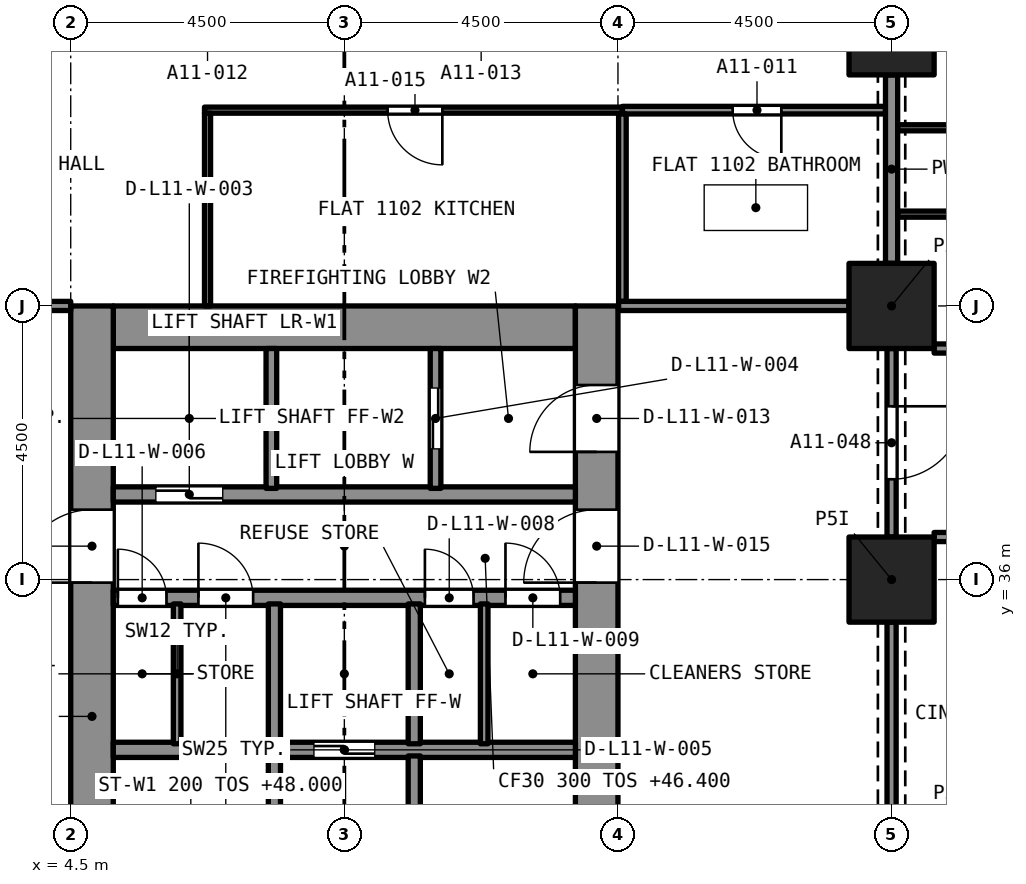
"""IFC4 building model, lengths in metres.
Left out: names, types, materials, properties, quantities, classifications, styles, units other than length and angle.
Written with IfcOpenShell. Run it as: python <this file> out.ifc"""

import sys

from ifc_helpers import new_model, si_unit, direction, frame, frame_2d, origin, origin_2d, place, context, subcontext, project, spatial, rectangle, extrude, element, fill, save


model = new_model("IFC4")
c1 = context("Model", 3, precision=1e-05, world=origin(), true_north=direction((0.0, 1.0)))
c2 = subcontext(c1, "Body", "Model", "MODEL_VIEW")
j1 = project(units=[si_unit("LENGTHUNIT", "METRE"), si_unit("PLANEANGLEUNIT", "RADIAN")], contexts=[c1])
p1 = place(None, origin())
s1 = spatial("IfcSite", under=j1, at=p1, CompositionType="ELEMENT")
p2 = place(p1, origin())
s2 = spatial("IfcBuilding", under=s1, at=p2, CompositionType="ELEMENT")
p3 = place(p2, frame((0.0, 0.0, 46.4)))
s3 = spatial("IfcBuildingStorey", under=s2, at=p3, CompositionType="ELEMENT", Elevation=46.4)
for number, where, z_axis, x_axis in (
    (1, (18.0, 36.0, 0.0), (0.0, 0.0, 1.0), (1.0, 0.0, 0.0)),
    (2, (18.0, 40.5, 0.0), (0.0, 0.0, 1.0), (1.0, 0.0, 0.0)),
    (3, (18.0, 45.0, 0.0), (0.0, 0.0, 1.0), (1.0, 0.0, 0.0)),
):
    element("IfcColumn", number, at=place(p3, frame(where, z_axis=z_axis, x_axis=x_axis)), inside=s3, PredefinedType="COLUMN", context=c2, shape_type="SweptSolid", body=[
        extrude(rectangle(XDim=1.4, YDim=1.4, at=origin_2d()), origin(), (0.0, 0.0, 1.0), 3.2),
    ])
p4 = place(p3, frame((5.2, 40.15, 0.0), z_axis=(0.0, 0.0, 1.0), x_axis=(1.0, 0.0, 0.0)))
e4 = element("IfcWall", 4, at=p4, inside=s3, PredefinedType="SOLIDWALL", context=c2, shape_type="SweptSolid", body=[
    extrude(rectangle(XDim=7.6, YDim=0.7, at=frame_2d((3.8, 0.0))), origin(), (0.0, 0.0, 1.0), 3.2),
])
p5 = place(p3, frame((4.85, 27.0, 0.0), z_axis=(0.0, 0.0, 1.0), x_axis=(0.0, 1.0, 0.0)))
e5 = element("IfcWall", 5, at=p5, inside=s3, PredefinedType="SOLIDWALL", context=c2, shape_type="SweptSolid", body=[
    extrude(rectangle(XDim=13.5, YDim=0.7, at=frame_2d((6.75, 0.0))), origin(), (0.0, 0.0, 1.0), 3.2),
])
p6 = place(p5, frame((8.95, 0.0, 0.0)))
e6 = element("IfcOpeningElement", 6, at=p6, cuts=e5, PredefinedType="OPENING", context=c2, shape_type="SweptSolid", body=[
    extrude(rectangle(XDim=1.2, YDim=2.1, at=frame_2d((0.6, 1.05))), frame((0.0, 0.36, 0.0), z_axis=(0.0, -1.0, 0.0), x_axis=(1.0, 0.0, 0.0)), (0.0, 0.0, 1.0), 0.72),
])
p7 = place(p3, frame((13.15, 27.0, 0.0), z_axis=(0.0, 0.0, 1.0), x_axis=(0.0, 1.0, 0.0)))
e7 = element("IfcWall", 7, at=p7, inside=s3, PredefinedType="SOLIDWALL", context=c2, shape_type="SweptSolid", body=[
    extrude(rectangle(XDim=13.5, YDim=0.7, at=frame_2d((6.75, 0.0))), origin(), (0.0, 0.0, 1.0), 3.2),
])
p8 = place(p7, frame((11.1, 0.0, 0.0)))
e8 = element("IfcOpeningElement", 8, at=p8, cuts=e7, PredefinedType="OPENING", context=c2, shape_type="SweptSolid", body=[
    extrude(rectangle(XDim=1.1, YDim=2.1, at=frame_2d((0.55, 1.05))), frame((0.0, 0.36, 0.0), z_axis=(0.0, -1.0, 0.0), x_axis=(1.0, 0.0, 0.0)), (0.0, 0.0, 1.0), 0.72),
])
p9 = place(p7, frame((8.95, 0.0, 0.0)))
e9 = element("IfcOpeningElement", 9, at=p9, cuts=e7, PredefinedType="OPENING", context=c2, shape_type="SweptSolid", body=[
    extrude(rectangle(XDim=1.2, YDim=2.1, at=frame_2d((0.6, 1.05))), frame((0.0, 0.36, 0.0), z_axis=(0.0, -1.0, 0.0), x_axis=(1.0, 0.0, 0.0)), (0.0, 0.0, 1.0), 0.72),
])
p10 = place(p3, frame((17.9, 43.72, 0.0), z_axis=(0.0, 0.0, 1.0), x_axis=(-1.0, 0.0, 0.0)))
e10 = element("IfcWall", 10, at=p10, inside=s3, PredefinedType="PARTITIONING", context=c2, shape_type="SweptSolid", body=[
    extrude(rectangle(XDim=4.327, YDim=0.125, at=frame_2d((2.163, 0.0))), origin(), (0.0, 0.0, 1.0), 2.9),
])
p11 = place(p10, frame((1.713, 0.0, 0.0)))
e11 = element("IfcOpeningElement", 11, at=p11, cuts=e10, PredefinedType="OPENING", context=c2, shape_type="SweptSolid", body=[
    extrude(rectangle(XDim=0.8, YDim=2.1, at=frame_2d((0.4, 1.05))), frame((0.0, 0.073, 0.0), z_axis=(0.0, -1.0, 0.0), x_axis=(1.0, 0.0, 0.0)), (0.0, 0.0, 1.0), 0.145),
])
p12 = place(p3, frame((13.573, 40.575, 0.0), z_axis=(0.0, 0.0, 1.0), x_axis=(0.0, 1.0, 0.0)))
e12 = element("IfcWall", 12, at=p12, inside=s3, PredefinedType="PARTITIONING", context=c2, shape_type="SweptSolid", body=[
    extrude(rectangle(XDim=3.083, YDim=0.125, at=frame_2d((1.541, 0.0))), origin(), (0.0, 0.0, 1.0), 2.9),
])
p13 = place(p3, frame((18.0, 41.2, 0.0), z_axis=(0.0, 0.0, 1.0), x_axis=(0.0, 1.0, 0.0)))
e13 = element("IfcWall", 13, at=p13, inside=s3, PredefinedType="PARTITIONING", context=c2, shape_type="SweptSolid", body=[
    extrude(rectangle(XDim=3.1, YDim=0.2, at=frame_2d((1.55, 0.0))), origin(), (0.0, 0.0, 1.0), 2.38),
])
p14 = place(p3, frame((13.511, 40.5, 0.0), z_axis=(0.0, 0.0, 1.0), x_axis=(1.0, 0.0, 0.0)))
e14 = element("IfcWall", 14, at=p14, inside=s3, PredefinedType="PARTITIONING", context=c2, shape_type="SweptSolid", body=[
    extrude(rectangle(XDim=3.789, YDim=0.15, at=frame_2d((1.895, 0.0))), origin(), (0.0, 0.0, 1.0), 2.9),
])
p15 = place(p3, frame((13.573, 43.72, 0.0), z_axis=(0.0, 0.0, 1.0), x_axis=(-1.0, 0.0, 0.0)))
e15 = element("IfcWall", 15, at=p15, inside=s3, PredefinedType="PARTITIONING", context=c2, shape_type="SweptSolid", body=[
    extrude(rectangle(XDim=6.873, YDim=0.1, at=frame_2d((3.437, 0.0))), origin(), (0.0, 0.0, 1.0), 2.9),
])
p16 = place(p15, frame((2.962, 0.0, 0.0)))
e16 = element("IfcOpeningElement", 16, at=p16, cuts=e15, PredefinedType="OPENING", context=c2, shape_type="SweptSolid", body=[
    extrude(rectangle(XDim=0.9, YDim=2.1, at=frame_2d((0.45, 1.05))), frame((0.0, 0.06, 0.0), z_axis=(0.0, -1.0, 0.0), x_axis=(1.0, 0.0, 0.0)), (0.0, 0.0, 1.0), 0.12),
])
p17 = place(p3, frame((6.75, 40.5, 0.0), z_axis=(0.0, 0.0, 1.0), x_axis=(0.0, 1.0, 0.0)))
e17 = element("IfcWall", 17, at=p17, inside=s3, PredefinedType="PARTITIONING", context=c2, shape_type="SweptSolid", body=[
    extrude(rectangle(XDim=3.17, YDim=0.1, at=frame_2d((1.585, 0.0))), origin(), (0.0, 0.0, 1.0), 2.9),
])
p18 = place(p3, frame((0.7, 40.5, 0.0), z_axis=(0.0, 0.0, 1.0), x_axis=(1.0, 0.0, 0.0)))
e18 = element("IfcWall", 18, at=p18, inside=s3, PredefinedType="PARTITIONING", context=c2, shape_type="SweptSolid", body=[
    extrude(rectangle(XDim=3.8, YDim=0.15, at=frame_2d((1.9, 0.0))), origin(), (0.0, 0.0, 1.0), 2.9),
])
p19 = place(p18, frame((1.05, 0.0, 0.0)))
e19 = element("IfcOpeningElement", 19, at=p19, cuts=e18, PredefinedType="OPENING", context=c2, shape_type="SweptSolid", body=[
    extrude(rectangle(XDim=1.0, YDim=2.1, at=frame_2d((0.5, 1.05))), frame((0.0, 0.085, 0.0), z_axis=(0.0, -1.0, 0.0), x_axis=(1.0, 0.0, 0.0)), (0.0, 0.0, 1.0), 0.17),
])
p20 = place(p3, frame((27.425, 42.01, 0.0), z_axis=(0.0, 0.0, 1.0), x_axis=(-1.0, 0.0, 0.0)))
e20 = element("IfcWall", 20, at=p20, inside=s3, PredefinedType="PARTITIONING", context=c2, shape_type="SweptSolid", body=[
    extrude(rectangle(XDim=9.325, YDim=0.1, at=frame_2d((4.663, 0.0))), origin(), (0.0, 0.0, 1.0), 2.75),
])
p21 = place(p20, frame((4.288, 0.0, 0.0)))
e21 = element("IfcOpeningElement", 21, at=p21, cuts=e20, PredefinedType="OPENING", context=c2, shape_type="SweptSolid", body=[
    extrude(rectangle(XDim=0.9, YDim=2.1, at=frame_2d((0.45, 1.05))), frame((0.0, 0.06, 0.0), z_axis=(0.0, -1.0, 0.0), x_axis=(1.0, 0.0, 0.0)), (0.0, 0.0, 1.0), 0.12),
])
p22 = place(p3, frame((18.1, 43.43, 0.0), z_axis=(0.0, 0.0, 1.0), x_axis=(1.0, 0.0, 0.0)))
e22 = element("IfcWall", 22, at=p22, inside=s3, PredefinedType="PARTITIONING", context=c2, shape_type="SweptSolid", body=[
    extrude(rectangle(XDim=4.4, YDim=0.1, at=frame_2d((2.2, 0.0))), origin(), (0.0, 0.0, 1.0), 2.75),
])
p23 = place(p22, frame((1.65, 0.0, 0.0)))
e23 = element("IfcOpeningElement", 23, at=p23, cuts=e22, PredefinedType="OPENING", context=c2, shape_type="SweptSolid", body=[
    extrude(rectangle(XDim=1.0, YDim=2.1, at=frame_2d((0.5, 1.05))), frame((0.0, 0.06, 0.0), z_axis=(0.0, -1.0, 0.0), x_axis=(1.0, 0.0, 0.0)), (0.0, 0.0, 1.0), 0.12),
])
p24 = place(p3, frame((18.7, 39.8, 0.0), z_axis=(0.0, 0.0, 1.0), x_axis=(1.0, 0.0, 0.0)))
e24 = element("IfcWall", 24, at=p24, inside=s3, PredefinedType="PARTITIONING", context=c2, shape_type="SweptSolid", body=[
    extrude(rectangle(XDim=8.675, YDim=0.15, at=frame_2d((4.337, 0.0))), origin(), (0.0, 0.0, 1.0), 2.75),
])
p25 = place(p3, frame((22.5, 36.7, 0.0), z_axis=(0.0, 0.0, 1.0), x_axis=(-1.0, 0.0, 0.0)))
e25 = element("IfcWall", 25, at=p25, inside=s3, PredefinedType="PARTITIONING", context=c2, shape_type="SweptSolid", body=[
    extrude(rectangle(XDim=3.8, YDim=0.15, at=frame_2d((1.9, 0.0))), origin(), (0.0, 0.0, 1.0), 2.75),
])
p26 = place(p25, frame((1.75, 0.0, 0.0)))
e26 = element("IfcOpeningElement", 26, at=p26, cuts=e25, PredefinedType="OPENING", context=c2, shape_type="SweptSolid", body=[
    extrude(rectangle(XDim=1.0, YDim=2.1, at=frame_2d((0.5, 1.05))), frame((0.0, 0.085, 0.0), z_axis=(0.0, -1.0, 0.0), x_axis=(1.0, 0.0, 0.0)), (0.0, 0.0, 1.0), 0.17),
])
p27 = place(p3, frame((18.0, 39.8, 0.0), z_axis=(0.0, 0.0, 1.0), x_axis=(0.0, -1.0, 0.0)))
e27 = element("IfcWall", 27, at=p27, inside=s3, PredefinedType="PARTITIONING", context=c2, shape_type="SweptSolid", body=[
    extrude(rectangle(XDim=3.1, YDim=0.15, at=frame_2d((1.55, 0.0))), origin(), (0.0, 0.0, 1.0), 2.38),
])
p28 = place(p27, frame((0.95, 0.0, 0.0)))
e28 = element("IfcOpeningElement", 28, at=p28, cuts=e27, PredefinedType="OPENING", context=c2, shape_type="SweptSolid", body=[
    extrude(rectangle(XDim=1.2, YDim=2.1, at=frame_2d((0.6, 1.05))), frame((0.0, 0.085, 0.0), z_axis=(0.0, -1.0, 0.0), x_axis=(1.0, 0.0, 0.0)), (0.0, 0.0, 1.0), 0.17),
])
p29 = place(p3, frame((18.0, 32.2, 0.0), z_axis=(0.0, 0.0, 1.0), x_axis=(0.0, 1.0, 0.0)))
e29 = element("IfcWall", 29, at=p29, inside=s3, PredefinedType="PARTITIONING", context=c2, shape_type="SweptSolid", body=[
    extrude(rectangle(XDim=3.1, YDim=0.15, at=frame_2d((1.55, 0.0))), origin(), (0.0, 0.0, 1.0), 2.38),
])
p30 = place(p3, frame((5.2, 33.2, 0.0), z_axis=(0.0, 0.0, 1.0), x_axis=(1.0, 0.0, 0.0)))
e30 = element("IfcWall", 30, at=p30, inside=s3, PredefinedType="SOLIDWALL", context=c2, shape_type="SweptSolid", body=[
    extrude(rectangle(XDim=7.6, YDim=0.25, at=frame_2d((3.8, 0.0))), origin(), (0.0, 0.0, 1.0), 2.9),
])
p31 = place(p30, frame((3.3, 0.0, 0.0)))
e31 = element("IfcOpeningElement", 31, at=p31, cuts=e30, PredefinedType="OPENING", context=c2, shape_type="SweptSolid", body=[
    extrude(rectangle(XDim=1.0, YDim=2.1, at=frame_2d((0.5, 1.05))), frame((0.0, 0.135, 0.0), z_axis=(0.0, -1.0, 0.0), x_axis=(1.0, 0.0, 0.0)), (0.0, 0.0, 1.0), 0.27),
])
p32 = place(p3, frame((5.2, 35.7, 0.0), z_axis=(0.0, 0.0, 1.0), x_axis=(1.0, 0.0, 0.0)))
e32 = element("IfcWall", 32, at=p32, inside=s3, PredefinedType="SOLIDWALL", context=c2, shape_type="SweptSolid", body=[
    extrude(rectangle(XDim=7.6, YDim=0.25, at=frame_2d((3.8, 0.0))), origin(), (0.0, 0.0, 1.0), 2.9),
])
p33 = place(p32, frame((0.075, 0.0, 0.0)))
e33 = element("IfcOpeningElement", 33, at=p33, cuts=e32, PredefinedType="OPENING", context=c2, shape_type="SweptSolid", body=[
    extrude(rectangle(XDim=0.8, YDim=2.1, at=frame_2d((0.4, 1.05))), frame((0.0, 0.135, 0.0), z_axis=(0.0, -1.0, 0.0), x_axis=(1.0, 0.0, 0.0)), (0.0, 0.0, 1.0), 0.27),
])
p34 = place(p32, frame((1.4, 0.0, 0.0)))
e34 = element("IfcOpeningElement", 34, at=p34, cuts=e32, PredefinedType="OPENING", context=c2, shape_type="SweptSolid", body=[
    extrude(rectangle(XDim=0.9, YDim=2.1, at=frame_2d((0.45, 1.05))), frame((0.0, 0.135, 0.0), z_axis=(0.0, -1.0, 0.0), x_axis=(1.0, 0.0, 0.0)), (0.0, 0.0, 1.0), 0.27),
])
p35 = place(p32, frame((5.125, 0.0, 0.0)))
e35 = element("IfcOpeningElement", 35, at=p35, cuts=e32, PredefinedType="OPENING", context=c2, shape_type="SweptSolid", body=[
    extrude(rectangle(XDim=0.8, YDim=2.1, at=frame_2d((0.4, 1.05))), frame((0.0, 0.135, 0.0), z_axis=(0.0, -1.0, 0.0), x_axis=(1.0, 0.0, 0.0)), (0.0, 0.0, 1.0), 0.27),
])
p36 = place(p32, frame((6.45, 0.0, 0.0)))
e36 = element("IfcOpeningElement", 36, at=p36, cuts=e32, PredefinedType="OPENING", context=c2, shape_type="SweptSolid", body=[
    extrude(rectangle(XDim=0.9, YDim=2.1, at=frame_2d((0.45, 1.05))), frame((0.0, 0.135, 0.0), z_axis=(0.0, -1.0, 0.0), x_axis=(1.0, 0.0, 0.0)), (0.0, 0.0, 1.0), 0.27),
])
p37 = place(p3, frame((5.2, 37.4, 0.0), z_axis=(0.0, 0.0, 1.0), x_axis=(1.0, 0.0, 0.0)))
e37 = element("IfcWall", 37, at=p37, inside=s3, PredefinedType="SOLIDWALL", context=c2, shape_type="SweptSolid", body=[
    extrude(rectangle(XDim=7.6, YDim=0.25, at=frame_2d((3.8, 0.0))), origin(), (0.0, 0.0, 1.0), 2.9),
])
p38 = place(p37, frame((0.7, 0.0, 0.0)))
e38 = element("IfcOpeningElement", 38, at=p38, cuts=e37, PredefinedType="OPENING", context=c2, shape_type="SweptSolid", body=[
    extrude(rectangle(XDim=1.1, YDim=2.4, at=frame_2d((0.55, 1.2))), frame((0.0, 0.135, 0.0), z_axis=(0.0, -1.0, 0.0), x_axis=(1.0, 0.0, 0.0)), (0.0, 0.0, 1.0), 0.27),
])
p39 = place(p3, frame((7.85, 27.7, 0.0), z_axis=(0.0, 0.0, 1.0), x_axis=(0.0, 1.0, 0.0)))
e39 = element("IfcWall", 39, at=p39, inside=s3, PredefinedType="SOLIDWALL", context=c2, shape_type="SweptSolid", body=[
    extrude(rectangle(XDim=5.4, YDim=0.2, at=frame_2d((2.7, 0.0))), origin(), (0.0, 0.0, 1.0), 2.9),
])
p40 = place(p39, frame((0.2, 0.0, 0.0)))
e40 = element("IfcOpeningElement", 40, at=p40, cuts=e39, PredefinedType="OPENING", context=c2, shape_type="SweptSolid", body=[
    extrude(rectangle(XDim=0.9, YDim=2.1, at=frame_2d((0.45, 1.05))), frame((0.0, 0.11, 0.0), z_axis=(0.0, -1.0, 0.0), x_axis=(1.0, 0.0, 0.0)), (0.0, 0.0, 1.0), 0.22),
])
p41 = place(p3, frame((10.15, 27.7, 0.0), z_axis=(0.0, 0.0, 1.0), x_axis=(0.0, 1.0, 0.0)))
e41 = element("IfcWall", 41, at=p41, inside=s3, PredefinedType="SOLIDWALL", context=c2, shape_type="SweptSolid", body=[
    extrude(rectangle(XDim=5.4, YDim=0.2, at=frame_2d((2.7, 0.0))), origin(), (0.0, 0.0, 1.0), 2.9),
])
p42 = place(p41, frame((0.2, 0.0, 0.0)))
e42 = element("IfcOpeningElement", 42, at=p42, cuts=e41, PredefinedType="OPENING", context=c2, shape_type="SweptSolid", body=[
    extrude(rectangle(XDim=0.9, YDim=2.1, at=frame_2d((0.45, 1.05))), frame((0.0, 0.11, 0.0), z_axis=(0.0, -1.0, 0.0), x_axis=(1.0, 0.0, 0.0)), (0.0, 0.0, 1.0), 0.22),
])
for number, where, z_axis, x_axis in (
    (43, (7.85, 33.3, 0.0), (0.0, 0.0, 1.0), (0.0, 1.0, 0.0)),
    (44, (10.15, 33.3, 0.0), (0.0, 0.0, 1.0), (0.0, 1.0, 0.0)),
):
    element("IfcWall", number, at=place(p3, frame(where, z_axis=z_axis, x_axis=x_axis)), inside=s3, PredefinedType="SOLIDWALL", context=c2, shape_type="SweptSolid", body=[
        extrude(rectangle(XDim=2.3, YDim=0.2, at=frame_2d((1.15, 0.0))), origin(), (0.0, 0.0, 1.0), 2.9),
    ])
p43 = place(p3, frame((7.8, 37.5, 0.0), z_axis=(0.0, 0.0, 1.0), x_axis=(0.0, 1.0, 0.0)))
e45 = element("IfcWall", 45, at=p43, inside=s3, PredefinedType="SOLIDWALL", context=c2, shape_type="SweptSolid", body=[
    extrude(rectangle(XDim=2.3, YDim=0.175, at=frame_2d((1.15, 0.0))), origin(), (0.0, 0.0, 1.0), 2.9),
])
p44 = place(p3, frame((10.5, 37.5, 0.0), z_axis=(0.0, 0.0, 1.0), x_axis=(0.0, 1.0, 0.0)))
e46 = element("IfcWall", 46, at=p44, inside=s3, PredefinedType="SOLIDWALL", context=c2, shape_type="SweptSolid", body=[
    extrude(rectangle(XDim=2.3, YDim=0.175, at=frame_2d((1.15, 0.0))), origin(), (0.0, 0.0, 1.0), 2.9),
])
p45 = place(p44, frame((0.65, 0.0, 0.0)))
e47 = element("IfcOpeningElement", 47, at=p45, cuts=e46, PredefinedType="OPENING", context=c2, shape_type="SweptSolid", body=[
    extrude(rectangle(XDim=1.0, YDim=2.1, at=frame_2d((0.5, 1.05))), frame((0.0, 0.097, 0.0), z_axis=(0.0, -1.0, 0.0), x_axis=(1.0, 0.0, 0.0)), (0.0, 0.0, 1.0), 0.195),
])
for number, where, z_axis, x_axis in (
    (48, (6.25, 33.3, 0.0), (0.0, 0.0, 1.0), (0.0, 1.0, 0.0)),
    (49, (11.3, 33.3, 0.0), (0.0, 0.0, 1.0), (0.0, 1.0, 0.0)),
):
    element("IfcWall", number, at=place(p3, frame(where, z_axis=z_axis, x_axis=x_axis)), inside=s3, PredefinedType="PARTITIONING", context=c2, shape_type="SweptSolid", body=[
        extrude(rectangle(XDim=2.3, YDim=0.125, at=frame_2d((1.15, 0.0))), origin(), (0.0, 0.0, 1.0), 2.9),
    ])
p46 = place(p11, origin())
e50 = element("IfcDoor", 50, at=p46, inside=s3, OperationType="SINGLE_SWING_LEFT", PredefinedType="DOOR", context=c2, shape_type="SweptSolid", body=[
    extrude(rectangle(XDim=0.8, YDim=2.1, at=frame_2d((0.4, 1.05))), frame((0.0, 0.025, 0.0), z_axis=(0.0, -1.0, 0.0), x_axis=(1.0, 0.0, 0.0)), (0.0, 0.0, 1.0), 0.05),
])
fill(e11, e50)
p47 = place(p16, origin())
e51 = element("IfcDoor", 51, at=p47, inside=s3, OperationType="SINGLE_SWING_LEFT", PredefinedType="DOOR", context=c2, shape_type="SweptSolid", body=[
    extrude(rectangle(XDim=0.9, YDim=2.1, at=frame_2d((0.45, 1.05))), frame((0.0, 0.025, 0.0), z_axis=(0.0, -1.0, 0.0), x_axis=(1.0, 0.0, 0.0)), (0.0, 0.0, 1.0), 0.05),
])
fill(e16, e51)
p48 = place(p28, origin())
e52 = element("IfcDoor", 52, at=p48, inside=s3, OperationType="SINGLE_SWING_LEFT", PredefinedType="DOOR", context=c2, shape_type="SweptSolid", body=[
    extrude(rectangle(XDim=1.2, YDim=2.1, at=frame_2d((0.6, 1.05))), frame((0.0, 0.025, 0.0), z_axis=(0.0, -1.0, 0.0), x_axis=(1.0, 0.0, 0.0)), (0.0, 0.0, 1.0), 0.05),
])
fill(e28, e52)
p49 = place(p38, origin())
e53 = element("IfcDoor", 53, at=p49, inside=s3, OperationType="SLIDING_TO_LEFT", PredefinedType="DOOR", context=c2, shape_type="SweptSolid", body=[
    extrude(rectangle(XDim=1.1, YDim=2.4, at=frame_2d((0.55, 1.2))), frame((0.0, 0.025, 0.0), z_axis=(0.0, -1.0, 0.0), x_axis=(1.0, 0.0, 0.0)), (0.0, 0.0, 1.0), 0.05),
])
fill(e38, e53)
p50 = place(p45, origin())
e54 = element("IfcDoor", 54, at=p50, inside=s3, OperationType="SLIDING_TO_LEFT", PredefinedType="DOOR", context=c2, shape_type="SweptSolid", body=[
    extrude(rectangle(XDim=1.0, YDim=2.1, at=frame_2d((0.5, 1.05))), frame((0.0, 0.025, 0.0), z_axis=(0.0, -1.0, 0.0), x_axis=(1.0, 0.0, 0.0)), (0.0, 0.0, 1.0), 0.05),
])
fill(e47, e54)
p51 = place(p31, origin())
e55 = element("IfcDoor", 55, at=p51, inside=s3, OperationType="SLIDING_TO_LEFT", PredefinedType="DOOR", context=c2, shape_type="SweptSolid", body=[
    extrude(rectangle(XDim=1.0, YDim=2.1, at=frame_2d((0.5, 1.05))), frame((0.0, 0.025, 0.0), z_axis=(0.0, -1.0, 0.0), x_axis=(1.0, 0.0, 0.0)), (0.0, 0.0, 1.0), 0.05),
])
fill(e31, e55)
p52 = place(p33, origin())
e56 = element("IfcDoor", 56, at=p52, inside=s3, OperationType="SINGLE_SWING_LEFT", PredefinedType="DOOR", context=c2, shape_type="SweptSolid", body=[
    extrude(rectangle(XDim=0.8, YDim=2.1, at=frame_2d((0.4, 1.05))), frame((0.0, 0.025, 0.0), z_axis=(0.0, -1.0, 0.0), x_axis=(1.0, 0.0, 0.0)), (0.0, 0.0, 1.0), 0.05),
])
fill(e33, e56)
p53 = place(p34, origin())
e57 = element("IfcDoor", 57, at=p53, inside=s3, OperationType="SINGLE_SWING_LEFT", PredefinedType="DOOR", context=c2, shape_type="SweptSolid", body=[
    extrude(rectangle(XDim=0.9, YDim=2.1, at=frame_2d((0.45, 1.05))), frame((0.0, 0.025, 0.0), z_axis=(0.0, -1.0, 0.0), x_axis=(1.0, 0.0, 0.0)), (0.0, 0.0, 1.0), 0.05),
])
fill(e34, e57)
p54 = place(p35, origin())
e58 = element("IfcDoor", 58, at=p54, inside=s3, OperationType="SINGLE_SWING_LEFT", PredefinedType="DOOR", context=c2, shape_type="SweptSolid", body=[
    extrude(rectangle(XDim=0.8, YDim=2.1, at=frame_2d((0.4, 1.05))), frame((0.0, 0.025, 0.0), z_axis=(0.0, -1.0, 0.0), x_axis=(1.0, 0.0, 0.0)), (0.0, 0.0, 1.0), 0.05),
])
fill(e35, e58)
p55 = place(p36, origin())
e59 = element("IfcDoor", 59, at=p55, inside=s3, OperationType="SINGLE_SWING_LEFT", PredefinedType="DOOR", context=c2, shape_type="SweptSolid", body=[
    extrude(rectangle(XDim=0.9, YDim=2.1, at=frame_2d((0.45, 1.05))), frame((0.0, 0.025, 0.0), z_axis=(0.0, -1.0, 0.0), x_axis=(1.0, 0.0, 0.0)), (0.0, 0.0, 1.0), 0.05),
])
fill(e36, e59)
p56 = place(p8, origin())
e60 = element("IfcDoor", 60, at=p56, inside=s3, OperationType="SINGLE_SWING_LEFT", PredefinedType="DOOR", context=c2, shape_type="SweptSolid", body=[
    extrude(rectangle(XDim=1.1, YDim=2.1, at=frame_2d((0.55, 1.05))), frame((0.0, 0.025, 0.0), z_axis=(0.0, -1.0, 0.0), x_axis=(1.0, 0.0, 0.0)), (0.0, 0.0, 1.0), 0.05),
])
fill(e8, e60)
p57 = place(p6, origin())
e61 = element("IfcDoor", 61, at=p57, inside=s3, OperationType="SINGLE_SWING_LEFT", PredefinedType="DOOR", context=c2, shape_type="SweptSolid", body=[
    extrude(rectangle(XDim=1.2, YDim=2.1, at=frame_2d((0.6, 1.05))), frame((0.0, 0.025, 0.0), z_axis=(0.0, -1.0, 0.0), x_axis=(1.0, 0.0, 0.0)), (0.0, 0.0, 1.0), 0.05),
])
fill(e6, e61)
p58 = place(p9, origin())
e62 = element("IfcDoor", 62, at=p58, inside=s3, OperationType="SINGLE_SWING_LEFT", PredefinedType="DOOR", context=c2, shape_type="SweptSolid", body=[
    extrude(rectangle(XDim=1.2, YDim=2.1, at=frame_2d((0.6, 1.05))), frame((0.0, 0.025, 0.0), z_axis=(0.0, -1.0, 0.0), x_axis=(1.0, 0.0, 0.0)), (0.0, 0.0, 1.0), 0.05),
])
fill(e9, e62)
save(model, sys.argv[1])
